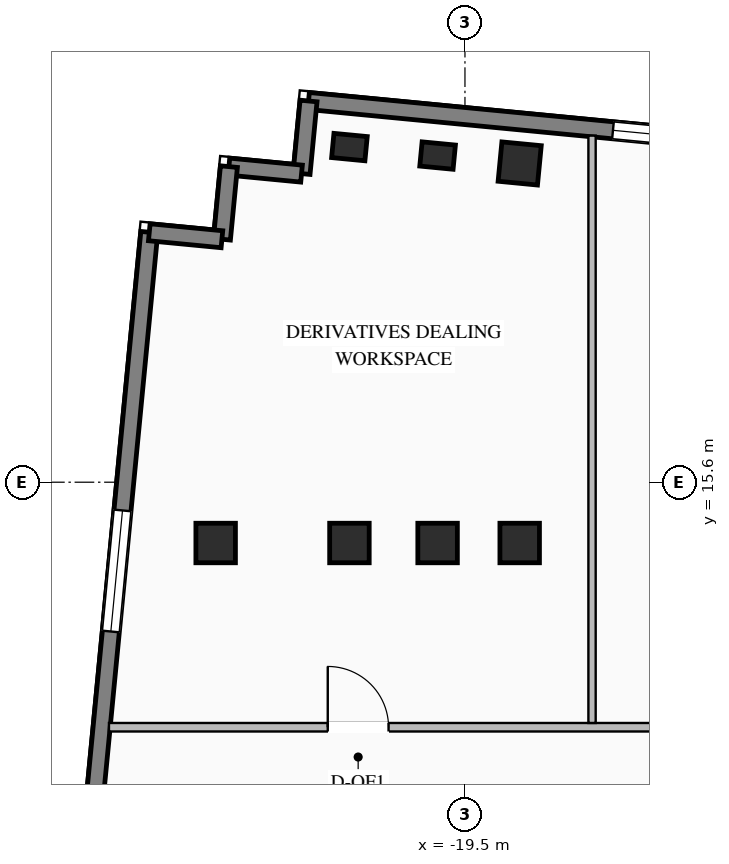
"""IFC4 building model, lengths in metres.
Left out: names, types, materials, properties, quantities, classifications, styles, units other than length and angle.
Written with IfcOpenShell. Run it as: python <this file> out.ifc"""

import sys

from ifc_helpers import new_model, si_unit, direction, frame, frame_2d, origin, origin_2d, place, context, subcontext, project, spatial, rectangle, i_section, extrude, element, fill, save


model = new_model("IFC4")
c1 = context("Model", 3, precision=1e-05, world=origin(), true_north=direction((0.0, 1.0)))
c2 = subcontext(c1, "Body", "Model", "MODEL_VIEW")
j1 = project(units=[si_unit("LENGTHUNIT", "METRE"), si_unit("PLANEANGLEUNIT", "RADIAN")], contexts=[c1])
p1 = place(None, origin())
s1 = spatial("IfcSite", under=j1, at=p1, CompositionType="ELEMENT")
p2 = place(p1, origin())
s2 = spatial("IfcBuilding", under=s1, at=p2, CompositionType="ELEMENT")
p3 = place(p2, frame((0.0, 0.0, 188.0)))
s3 = spatial("IfcBuildingStorey", under=s2, at=p3, CompositionType="ELEMENT", Elevation=188.0)
for number, where, z_axis, x_axis in (
    (1, (-21.4, 14.6, 0.0), (0.0, 0.0, 1.0), (1.0, 0.0, 0.0)),
    (2, (-19.95, 14.6, 0.0), (0.0, 0.0, 1.0), (1.0, 0.0, 0.0)),
    (3, (-18.6, 14.6, 0.0), (0.0, 0.0, 1.0), (1.0, 0.0, 0.0)),
    (4, (-23.6, 14.6, 0.0), (0.0, 0.0, 1.0), (1.0, 0.0, 0.0)),
    (5, (-18.6, 20.842, 0.0), (0.0, 0.0, 1.0), (0.995, -0.096, 0.0)),
):
    element("IfcColumn", number, at=place(p3, frame(where, z_axis=z_axis, x_axis=x_axis)), inside=s3, PredefinedType="COLUMN", context=c2, shape_type="SweptSolid", body=[
        extrude(i_section(OverallWidth=0.65, OverallDepth=0.65, WebThickness=0.028, FlangeThickness=0.04, at=origin_2d()), origin(), (0.0, 0.0, 1.0), 3.45),
    ])
for number, where, z_axis, x_axis in (
    (6, (-21.4, 21.112, 0.0), (0.0, 0.0, 1.0), (0.995, -0.096, 0.0)),
    (7, (-19.95, 20.972, 0.0), (0.0, 0.0, 1.0), (0.995, -0.096, 0.0)),
):
    element("IfcColumn", number, at=place(p3, frame(where, z_axis=z_axis, x_axis=x_axis)), inside=s3, PredefinedType="PILASTER", context=c2, shape_type="SweptSolid", body=[
        extrude(rectangle(XDim=0.55, YDim=0.4, at=origin_2d()), origin(), (0.0, 0.0, 1.0), 3.45),
    ])
p4 = place(p3, frame((-22.073, 21.87, 0.0), z_axis=(0.0, 0.0, 1.0), x_axis=(0.995395606285, -0.095851901334, 0.0)))
e8 = element("IfcWall", 8, at=p4, inside=s3, PredefinedType="STANDARD", context=c2, shape_type="SweptSolid", body=[
    extrude(rectangle(XDim=14.34, YDim=0.28, at=frame_2d((7.17, 0.0))), origin(), (0.0, 0.0, 1.0), 3.25),
])
p5 = place(p4, frame((5.03, 0.0, 0.76)))
e9 = element("IfcOpeningElement", 9, at=p5, cuts=e8, PredefinedType="OPENING", context=c2, shape_type="SweptSolid", body=[
    extrude(rectangle(XDim=1.6, YDim=1.95, at=frame_2d((0.8, 0.975))), frame((0.0, 0.15, 0.0), z_axis=(0.0, -1.0, 0.0), x_axis=(1.0, 0.0, 0.0)), (0.0, 0.0, 1.0), 0.3),
])
p6 = place(p4, frame((8.76, 0.0, 0.76)))
e10 = element("IfcOpeningElement", 10, at=p6, cuts=e8, PredefinedType="OPENING", context=c2, shape_type="SweptSolid", body=[
    extrude(rectangle(XDim=1.6, YDim=1.95, at=frame_2d((0.8, 0.975))), frame((0.0, 0.15, 0.0), z_axis=(0.0, -1.0, 0.0), x_axis=(1.0, 0.0, 0.0)), (0.0, 0.0, 1.0), 0.3),
])
p7 = place(p3, frame((-26.301, 2.998, 0.0), z_axis=(0.0, 0.0, 1.0), x_axis=(0.095837640115, 0.99539697947, 0.0)))
e11 = element("IfcWall", 11, at=p7, inside=s3, PredefinedType="STANDARD", context=c2, shape_type="SweptSolid", body=[
    extrude(rectangle(XDim=16.79, YDim=0.28, at=frame_2d((8.395, 0.0))), origin(), (0.0, 0.0, 1.0), 3.25),
])
p8 = place(p7, frame((3.547, 0.0, 0.76)))
e12 = element("IfcOpeningElement", 12, at=p8, cuts=e11, PredefinedType="OPENING", context=c2, shape_type="SweptSolid", body=[
    extrude(rectangle(XDim=2.0, YDim=2.05, at=frame_2d((1.0, 1.025))), frame((0.0, 0.15, 0.0), z_axis=(0.0, -1.0, 0.0), x_axis=(1.0, 0.0, 0.0)), (0.0, 0.0, 1.0), 0.3),
])
p9 = place(p7, frame((10.193, 0.0, 0.76)))
e13 = element("IfcOpeningElement", 13, at=p9, cuts=e11, PredefinedType="OPENING", context=c2, shape_type="SweptSolid", body=[
    extrude(rectangle(XDim=2.0, YDim=2.05, at=frame_2d((1.0, 1.025))), frame((0.0, 0.15, 0.0), z_axis=(0.0, -1.0, 0.0), x_axis=(1.0, 0.0, 0.0)), (0.0, 0.0, 1.0), 0.3),
])
for number, where, z_axis, x_axis in (
    (14, (-22.073, 21.87, 0.0), (0.0, 0.0, 1.0), (-0.096, -0.995, 0.0)),
    (15, (-22.188, 20.676, 0.0), (0.0, 0.0, 1.0), (-0.995, 0.096, 0.0)),
    (16, (-23.382, 20.791, 0.0), (0.0, 0.0, 1.0), (-0.096, -0.995, 0.0)),
    (17, (-23.497, 19.596, 0.0), (0.0, 0.0, 1.0), (-0.995, 0.096, 0.0)),
):
    element("IfcWall", number, at=place(p3, frame(where, z_axis=z_axis, x_axis=x_axis)), inside=s3, PredefinedType="STANDARD", context=c2, shape_type="SweptSolid", body=[
        extrude(rectangle(XDim=1.2, YDim=0.28, at=frame_2d((0.6, 0.0))), origin(), (0.0, 0.0, 1.0), 3.25),
    ])
p10 = place(p3, frame((-25.355, 11.57, 0.0), z_axis=(0.0, 0.0, 1.0), x_axis=(1.0, 0.0, 0.0)))
e18 = element("IfcWall", 18, at=p10, inside=s3, PredefinedType="STANDARD", context=c2, shape_type="SweptSolid", body=[
    extrude(rectangle(XDim=60.519, YDim=0.14, at=frame_2d((30.259, 0.0))), origin(), (0.0, 0.0, 1.0), 2.795),
])
p11 = place(p10, frame((3.598, 0.0, 0.0)))
e19 = element("IfcOpeningElement", 19, at=p11, cuts=e18, PredefinedType="OPENING", context=c2, shape_type="SweptSolid", body=[
    extrude(rectangle(XDim=1.0, YDim=2.08, at=frame_2d((0.5, 1.04))), frame((0.0, 0.08, 0.0), z_axis=(0.0, -1.0, 0.0), x_axis=(1.0, 0.0, 0.0)), (0.0, 0.0, 1.0), 0.16),
])
p12 = place(p10, frame((11.688, 0.0, 0.0)))
e20 = element("IfcOpeningElement", 20, at=p12, cuts=e18, PredefinedType="OPENING", context=c2, shape_type="SweptSolid", body=[
    extrude(rectangle(XDim=1.0, YDim=2.08, at=frame_2d((0.5, 1.04))), frame((0.0, 0.08, 0.0), z_axis=(0.0, -1.0, 0.0), x_axis=(1.0, 0.0, 0.0)), (0.0, 0.0, 1.0), 0.16),
])
p13 = place(p10, frame((20.475, 0.0, 0.0)))
e21 = element("IfcOpeningElement", 21, at=p13, cuts=e18, PredefinedType="OPENING", context=c2, shape_type="SweptSolid", body=[
    extrude(rectangle(XDim=1.0, YDim=2.08, at=frame_2d((0.5, 1.04))), frame((0.0, 0.08, 0.0), z_axis=(0.0, -1.0, 0.0), x_axis=(1.0, 0.0, 0.0)), (0.0, 0.0, 1.0), 0.16),
])
p14 = place(p10, frame((29.565, 0.0, 0.0)))
e22 = element("IfcOpeningElement", 22, at=p14, cuts=e18, PredefinedType="OPENING", context=c2, shape_type="SweptSolid", body=[
    extrude(rectangle(XDim=1.0, YDim=2.08, at=frame_2d((0.5, 1.04))), frame((0.0, 0.08, 0.0), z_axis=(0.0, -1.0, 0.0), x_axis=(1.0, 0.0, 0.0)), (0.0, 0.0, 1.0), 0.16),
])
p15 = place(p10, frame((38.655, 0.0, 0.0)))
e23 = element("IfcOpeningElement", 23, at=p15, cuts=e18, PredefinedType="OPENING", context=c2, shape_type="SweptSolid", body=[
    extrude(rectangle(XDim=1.0, YDim=2.08, at=frame_2d((0.5, 1.04))), frame((0.0, 0.08, 0.0), z_axis=(0.0, -1.0, 0.0), x_axis=(1.0, 0.0, 0.0)), (0.0, 0.0, 1.0), 0.16),
])
p16 = place(p10, frame((47.442, 0.0, 0.0)))
e24 = element("IfcOpeningElement", 24, at=p16, cuts=e18, PredefinedType="OPENING", context=c2, shape_type="SweptSolid", body=[
    extrude(rectangle(XDim=1.0, YDim=2.08, at=frame_2d((0.5, 1.04))), frame((0.0, 0.08, 0.0), z_axis=(0.0, -1.0, 0.0), x_axis=(1.0, 0.0, 0.0)), (0.0, 0.0, 1.0), 0.16),
])
p17 = place(p10, frame((55.725, 0.0, 0.0)))
e25 = element("IfcOpeningElement", 25, at=p17, cuts=e18, PredefinedType="OPENING", context=c2, shape_type="SweptSolid", body=[
    extrude(rectangle(XDim=1.0, YDim=2.08, at=frame_2d((0.5, 1.04))), frame((0.0, 0.08, 0.0), z_axis=(0.0, -1.0, 0.0), x_axis=(1.0, 0.0, 0.0)), (0.0, 0.0, 1.0), 0.16),
])
p18 = place(p3, frame((-17.41, 11.64, 0.0), z_axis=(0.0, 0.0, 1.0), x_axis=(0.0, 1.0, 0.0)))
e26 = element("IfcWall", 26, at=p18, inside=s3, PredefinedType="STANDARD", context=c2, shape_type="SweptSolid", body=[
    extrude(rectangle(XDim=9.661, YDim=0.12, at=frame_2d((4.83, 0.0))), origin(), (0.0, 0.0, 1.0), 3.25),
])
p19 = place(p5, origin())
e27 = element("IfcWindow", 27, at=p19, inside=s3, PartitioningType="SINGLE_PANEL", PredefinedType="WINDOW", context=c2, shape_type="SweptSolid", body=[
    extrude(rectangle(XDim=1.6, YDim=1.95, at=frame_2d((0.8, 0.975))), frame((0.0, 0.03, 0.0), z_axis=(0.0, -1.0, 0.0), x_axis=(1.0, 0.0, 0.0)), (0.0, 0.0, 1.0), 0.06),
])
fill(e9, e27)
p20 = place(p9, origin())
e28 = element("IfcWindow", 28, at=p20, inside=s3, PartitioningType="DOUBLE_PANEL_VERTICAL", PredefinedType="WINDOW", context=c2, shape_type="SweptSolid", body=[
    extrude(rectangle(XDim=2.0, YDim=2.05, at=frame_2d((1.0, 1.025))), frame((0.0, 0.03, 0.0), z_axis=(0.0, -1.0, 0.0), x_axis=(1.0, 0.0, 0.0)), (0.0, 0.0, 1.0), 0.06),
])
fill(e13, e28)
p21 = place(p11, origin())
e29 = element("IfcDoor", 29, at=p21, inside=s3, OperationType="SINGLE_SWING_LEFT", PredefinedType="DOOR", context=c2, shape_type="SweptSolid", body=[
    extrude(rectangle(XDim=1.0, YDim=2.08, at=frame_2d((0.5, 1.04))), frame((0.0, 0.025, 0.0), z_axis=(0.0, -1.0, 0.0), x_axis=(1.0, 0.0, 0.0)), (0.0, 0.0, 1.0), 0.05),
])
fill(e19, e29)
save(model, sys.argv[1])
